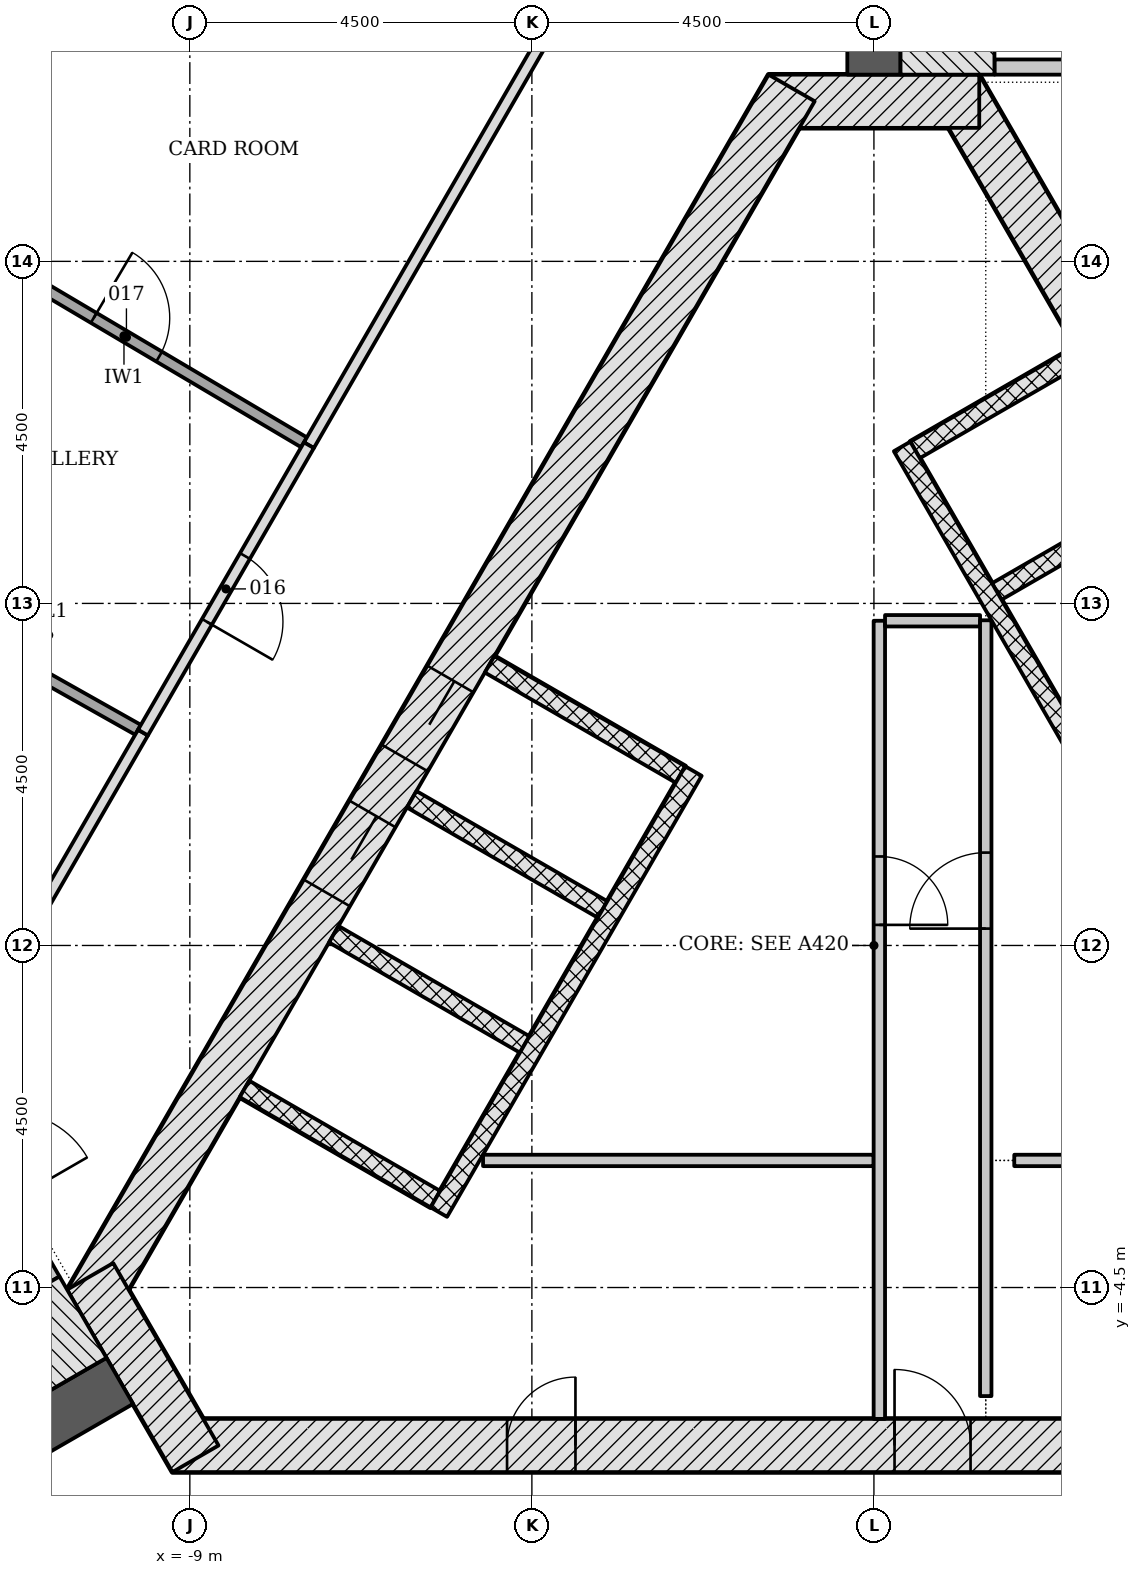
"""IFC4 building model, lengths in metres.
Left out: names, types, materials, properties, quantities, classifications, styles, units other than length and angle.
Written with IfcOpenShell. Run it as: python <this file> out.ifc"""

import sys

from ifc_helpers import new_model, si_unit, direction, frame, frame_2d, origin, place, context, subcontext, project, spatial, rectangle, extrude, element, fill, save


model = new_model("IFC4")
c1 = context("Model", 3, precision=1e-05, world=origin(), true_north=direction((0.0, 1.0)))
c2 = subcontext(c1, "Body", "Model", "MODEL_VIEW")
j1 = project(units=[si_unit("LENGTHUNIT", "METRE"), si_unit("PLANEANGLEUNIT", "RADIAN")], contexts=[c1])
p1 = place(None, origin())
s1 = spatial("IfcSite", under=j1, at=p1, CompositionType="ELEMENT")
p2 = place(p1, origin())
s2 = spatial("IfcBuilding", under=s1, at=p2, CompositionType="ELEMENT")
p3 = place(p2, frame((0.0, 0.0, 188.7)))
s3 = spatial("IfcBuildingStorey", under=s2, at=p3, CompositionType="ELEMENT", Elevation=188.7)
p4 = place(p3, frame((-9.229, -6.578, -0.2), z_axis=(0.0, 0.0, 1.0), x_axis=(1.0, 0.0, 0.0)))
e1 = element("IfcWall", 1, at=p4, inside=s3, PredefinedType="SHEAR", context=c2, shape_type="SweptSolid", body=[
    extrude(rectangle(XDim=18.458, YDim=0.7, at=frame_2d((9.229, 0.0))), origin(), (0.0, 0.0, 1.0), 3.6),
])
p5 = place(p4, frame((9.5, 0.0, 0.2)))
e2 = element("IfcOpeningElement", 2, at=p5, cuts=e1, PredefinedType="OPENING", context=c2, shape_type="SweptSolid", body=[
    extrude(rectangle(XDim=1.0, YDim=2.1, at=frame_2d((0.5, 1.05))), frame((0.0, 0.36, 0.0), z_axis=(0.0, -1.0, 0.0), x_axis=(1.0, 0.0, 0.0)), (0.0, 0.0, 1.0), 0.72),
])
p6 = place(p4, frame((4.402, 0.0, 0.2)))
e3 = element("IfcOpeningElement", 3, at=p6, cuts=e1, PredefinedType="OPENING", context=c2, shape_type="SweptSolid", body=[
    extrude(rectangle(XDim=0.9, YDim=2.1, at=frame_2d((0.45, 1.05))), frame((0.0, 0.36, 0.0), z_axis=(0.0, -1.0, 0.0), x_axis=(1.0, 0.0, 0.0)), (0.0, 0.0, 1.0), 0.72),
])
p7 = place(p4, frame((13.927, 0.0, 0.2)))
e4 = element("IfcOpeningElement", 4, at=p7, cuts=e1, PredefinedType="OPENING", context=c2, shape_type="SweptSolid", body=[
    extrude(rectangle(XDim=0.9, YDim=2.1, at=frame_2d((0.45, 1.05))), frame((0.0, 0.36, 0.0), z_axis=(0.0, -1.0, 0.0), x_axis=(1.0, 0.0, 0.0)), (0.0, 0.0, 1.0), 0.72),
])
p8 = place(p3, frame((10.311, -4.703, -0.2), z_axis=(0.0, 0.0, 1.0), x_axis=(-0.500001446645, 0.866024568562, 0.0)))
e5 = element("IfcWall", 5, at=p8, inside=s3, PredefinedType="SHEAR", context=c2, shape_type="SweptSolid", body=[
    extrude(rectangle(XDim=18.458, YDim=0.7, at=frame_2d((9.229, 0.0))), origin(), (0.0, 0.0, 1.0), 3.6),
])
p9 = place(p8, frame((4.379, 0.0, 0.2)))
e6 = element("IfcOpeningElement", 6, at=p9, cuts=e5, PredefinedType="OPENING", context=c2, shape_type="SweptSolid", body=[
    extrude(rectangle(XDim=1.1, YDim=2.1, at=frame_2d((0.55, 1.05))), frame((0.0, 0.36, 0.0), z_axis=(0.0, -1.0, 0.0), x_axis=(1.0, 0.0, 0.0)), (0.0, 0.0, 1.0), 0.72),
])
p10 = place(p8, frame((6.529, 0.0, 0.2)))
e7 = element("IfcOpeningElement", 7, at=p10, cuts=e5, PredefinedType="OPENING", context=c2, shape_type="SweptSolid", body=[
    extrude(rectangle(XDim=1.1, YDim=2.1, at=frame_2d((0.55, 1.05))), frame((0.0, 0.36, 0.0), z_axis=(0.0, -1.0, 0.0), x_axis=(1.0, 0.0, 0.0)), (0.0, 0.0, 1.0), 0.72),
])
p11 = place(p8, frame((8.679, 0.0, 0.2)))
e8 = element("IfcOpeningElement", 8, at=p11, cuts=e5, PredefinedType="OPENING", context=c2, shape_type="SweptSolid", body=[
    extrude(rectangle(XDim=1.1, YDim=2.1, at=frame_2d((0.55, 1.05))), frame((0.0, 0.36, 0.0), z_axis=(0.0, -1.0, 0.0), x_axis=(1.0, 0.0, 0.0)), (0.0, 0.0, 1.0), 0.72),
])
p12 = place(p8, frame((10.829, 0.0, 0.2)))
e9 = element("IfcOpeningElement", 9, at=p12, cuts=e5, PredefinedType="OPENING", context=c2, shape_type="SweptSolid", body=[
    extrude(rectangle(XDim=1.1, YDim=2.1, at=frame_2d((0.55, 1.05))), frame((0.0, 0.36, 0.0), z_axis=(0.0, -1.0, 0.0), x_axis=(1.0, 0.0, 0.0)), (0.0, 0.0, 1.0), 0.72),
])
p13 = place(p8, frame((12.979, 0.0, 0.2)))
e10 = element("IfcOpeningElement", 10, at=p13, cuts=e5, PredefinedType="OPENING", context=c2, shape_type="SweptSolid", body=[
    extrude(rectangle(XDim=1.1, YDim=2.1, at=frame_2d((0.55, 1.05))), frame((0.0, 0.36, 0.0), z_axis=(0.0, -1.0, 0.0), x_axis=(1.0, 0.0, 0.0)), (0.0, 0.0, 1.0), 0.72),
])
p14 = place(p3, frame((1.386, 11.106, -0.2), z_axis=(0.0, 0.0, 1.0), x_axis=(-1.0, 0.0, 0.0)))
e11 = element("IfcWall", 11, at=p14, inside=s3, PredefinedType="SHEAR", context=c2, shape_type="SweptSolid", body=[
    extrude(rectangle(XDim=2.771, YDim=0.7, at=frame_2d((1.386, 0.0))), origin(), (0.0, 0.0, 1.0), 3.6),
])
p15 = place(p3, frame((-1.083, 11.281, -0.2), z_axis=(0.0, 0.0, 1.0), x_axis=(-0.500001446645, -0.866024568562, 0.0)))
e12 = element("IfcWall", 12, at=p15, inside=s3, PredefinedType="SHEAR", context=c2, shape_type="SweptSolid", body=[
    extrude(rectangle(XDim=18.458, YDim=0.7, at=frame_2d((9.229, 0.0))), origin(), (0.0, 0.0, 1.0), 3.6),
])
p16 = place(p15, frame((8.979, 0.0, 0.2)))
e13 = element("IfcOpeningElement", 13, at=p16, cuts=e12, PredefinedType="OPENING", context=c2, shape_type="SweptSolid", body=[
    extrude(rectangle(XDim=1.2, YDim=2.1, at=frame_2d((0.6, 1.05))), frame((0.0, 0.36, 0.0), z_axis=(0.0, -1.0, 0.0), x_axis=(1.0, 0.0, 0.0)), (0.0, 0.0, 1.0), 0.72),
])
p17 = place(p15, frame((11.029, 0.0, 0.2)))
e14 = element("IfcOpeningElement", 14, at=p17, cuts=e12, PredefinedType="OPENING", context=c2, shape_type="SweptSolid", body=[
    extrude(rectangle(XDim=1.2, YDim=2.1, at=frame_2d((0.6, 1.05))), frame((0.0, 0.36, 0.0), z_axis=(0.0, -1.0, 0.0), x_axis=(1.0, 0.0, 0.0)), (0.0, 0.0, 1.0), 0.72),
])
p18 = place(p3, frame((-10.311, -4.353, -0.2), z_axis=(0.0, 0.0, 1.0), x_axis=(0.500042739161, -0.866000726912, 0.0)))
e15 = element("IfcWall", 15, at=p18, inside=s3, PredefinedType="SHEAR", context=c2, shape_type="SweptSolid", body=[
    extrude(rectangle(XDim=2.771, YDim=0.7, at=frame_2d((1.386, 0.0))), origin(), (0.0, 0.0, 1.0), 3.6),
])
p19 = place(p3, frame((0.0, 11.456, -0.2), z_axis=(0.0, 0.0, 1.0), x_axis=(0.0, 1.0, 0.0)))
e16 = element("IfcWall", 16, at=p19, inside=s3, PredefinedType="SHEAR", context=c2, shape_type="SweptSolid", body=[
    extrude(rectangle(XDim=9.522, YDim=0.7, at=frame_2d((4.761, 0.0))), origin(), (0.0, 0.0, 1.0), 3.6),
])
p20 = place(p3, frame((-9.922, -5.728, -0.2), z_axis=(0.0, 0.0, 1.0), x_axis=(-0.866025463095, -0.499999897272, 0.0)))
e17 = element("IfcWall", 17, at=p20, inside=s3, PredefinedType="SHEAR", context=c2, shape_type="SweptSolid", body=[
    extrude(rectangle(XDim=9.521, YDim=0.7, at=frame_2d((4.761, 0.0))), origin(), (0.0, 0.0, 1.0), 3.6),
])
for number, where, z_axis, x_axis in (
    (18, (3.781, 5.907, -0.2), (0.0, 0.0, 1.0), (-0.866, -0.5, 0.0)),
    (19, (2.706, 7.769, -0.2), (0.0, 0.0, 1.0), (-0.866, -0.5, 0.0)),
):
    element("IfcWall", number, at=place(p3, frame(where, z_axis=z_axis, x_axis=x_axis)), inside=s3, PredefinedType="PARTITIONING", context=c2, shape_type="SweptSolid", body=[
        extrude(rectangle(XDim=2.5, YDim=0.25, at=frame_2d((1.25, 0.0))), origin(), (0.0, 0.0, 1.0), 3.6),
    ])
p21 = place(p3, frame((5.87, -2.961, 0.0), z_axis=(0.0, 0.0, 1.0), x_axis=(-0.50000615651, 0.866021849293, 0.0)))
e20 = element("IfcWall", 20, at=p21, inside=s3, PredefinedType="PARTITIONING", context=c2, shape_type="SweptSolid", body=[
    extrude(rectangle(XDim=11.0, YDim=0.25, at=frame_2d((5.5, 0.0))), origin(), (0.0, 0.0, 1.0), 3.4),
])
for number, where, z_axis, x_axis in (
    (21, (-5.056, 3.699, -0.2), (0.0, 0.0, 1.0), (0.866, -0.5, 0.0)),
    (22, (-6.081, 1.923, -0.2), (0.0, 0.0, 1.0), (0.866, -0.5, 0.0)),
    (23, (-7.106, 0.148, -0.2), (0.0, 0.0, 1.0), (0.866, -0.5, 0.0)),
    (24, (-8.281, -1.887, -0.2), (0.0, 0.0, 1.0), (0.866, -0.5, 0.0)),
):
    element("IfcWall", number, at=place(p3, frame(where, z_axis=z_axis, x_axis=x_axis)), inside=s3, PredefinedType="PARTITIONING", context=c2, shape_type="SweptSolid", body=[
        extrude(rectangle(XDim=2.9, YDim=0.25, at=frame_2d((1.45, 0.0))), origin(), (0.0, 0.0, 1.0), 3.6),
    ])
p22 = place(p3, frame((-2.374, 2.294, 0.0), z_axis=(0.0, 0.0, 1.0), x_axis=(-0.500003174267, -0.866023571113, 0.0)))
e25 = element("IfcWall", 25, at=p22, inside=s3, PredefinedType="PARTITIONING", context=c2, shape_type="SweptSolid", body=[
    extrude(rectangle(XDim=6.7, YDim=0.25, at=frame_2d((3.35, 0.0))), origin(), (0.0, 0.0, 1.0), 3.4),
])
p23 = place(p3, frame((-5.142, -2.828, 0.0), z_axis=(0.0, 0.0, 1.0), x_axis=(1.0, 0.0, 0.0)))
e26 = element("IfcWall", 26, at=p23, inside=s3, PredefinedType="PARTITIONING", context=c2, shape_type="SweptSolid", body=[
    extrude(rectangle(XDim=5.139, YDim=0.15, at=frame_2d((2.569, 0.0))), origin(), (0.0, 0.0, 1.0), 3.4),
])
p24 = place(p3, frame((0.071, 4.272, 0.0), z_axis=(0.0, 0.0, 1.0), x_axis=(0.0, -1.0, 0.0)))
e27 = element("IfcWall", 27, at=p24, inside=s3, PredefinedType="PARTITIONING", context=c2, shape_type="SweptSolid", body=[
    extrude(rectangle(XDim=10.5, YDim=0.15, at=frame_2d((5.25, 0.0))), origin(), (0.0, 0.0, 1.0), 3.4),
])
p25 = place(p24, frame((3.101, 0.0, 0.0)))
e28 = element("IfcOpeningElement", 28, at=p25, cuts=e27, PredefinedType="OPENING", context=c2, shape_type="SweptSolid", body=[
    extrude(rectangle(XDim=0.9, YDim=2.1, at=frame_2d((0.45, 1.05))), frame((0.0, 0.085, 0.0), z_axis=(0.0, -1.0, 0.0), x_axis=(1.0, 0.0, 0.0)), (0.0, 0.0, 1.0), 0.17),
])
p26 = place(p3, frame((0.146, 4.272, 0.0), z_axis=(0.0, 0.0, 1.0), x_axis=(1.0, 0.0, 0.0)))
e29 = element("IfcWall", 29, at=p26, inside=s3, PredefinedType="PARTITIONING", context=c2, shape_type="SweptSolid", body=[
    extrude(rectangle(XDim=1.25, YDim=0.15, at=frame_2d((0.625, 0.0))), origin(), (0.0, 0.0, 1.0), 3.4),
])
p27 = place(p3, frame((1.471, -5.928, 0.0), z_axis=(0.0, 0.0, 1.0), x_axis=(0.0, 1.0, 0.0)))
e30 = element("IfcWall", 30, at=p27, inside=s3, PredefinedType="PARTITIONING", context=c2, shape_type="SweptSolid", body=[
    extrude(rectangle(XDim=10.206, YDim=0.15, at=frame_2d((5.103, 0.0))), origin(), (0.0, 0.0, 1.0), 3.4),
])
p28 = place(p27, frame((6.15, 0.0, 0.0)))
e31 = element("IfcOpeningElement", 31, at=p28, cuts=e30, PredefinedType="OPENING", context=c2, shape_type="SweptSolid", body=[
    extrude(rectangle(XDim=1.0, YDim=2.1, at=frame_2d((0.5, 1.05))), frame((0.0, 0.085, 0.0), z_axis=(0.0, -1.0, 0.0), x_axis=(1.0, 0.0, 0.0)), (0.0, 0.0, 1.0), 0.17),
])
p29 = place(p3, frame((1.846, -2.828, 0.0), z_axis=(0.0, 0.0, 1.0), x_axis=(1.0, 0.0, 0.0)))
e32 = element("IfcWall", 32, at=p29, inside=s3, PredefinedType="PARTITIONING", context=c2, shape_type="SweptSolid", body=[
    extrude(rectangle(XDim=3.758, YDim=0.15, at=frame_2d((1.879, 0.0))), origin(), (0.0, 0.0, 1.0), 3.4),
])
p30 = place(p3, frame((5.135, 11.556, -0.2), z_axis=(0.0, 0.0, 1.0), x_axis=(-1.0, 0.0, 0.0)))
e33 = element("IfcWall", 33, at=p30, inside=s3, PredefinedType="SHEAR", context=c2, shape_type="SweptSolid", body=[
    extrude(rectangle(XDim=3.55, YDim=0.2, at=frame_2d((1.775, 0.0))), origin(), (0.0, 0.0, 1.0), 3.6),
])
p31 = place(p30, frame((1.175, 0.0, 0.2)))
e34 = element("IfcOpeningElement", 34, at=p31, cuts=e33, PredefinedType="OPENING", context=c2, shape_type="SweptSolid", body=[
    extrude(rectangle(XDim=1.2, YDim=2.1, at=frame_2d((0.6, 1.05))), frame((0.0, 0.11, 0.0), z_axis=(0.0, -1.0, 0.0), x_axis=(1.0, 0.0, 0.0)), (0.0, 0.0, 1.0), 0.22),
])
p32 = place(p3, frame((0.968, 11.456, -0.2), z_axis=(0.0, 0.0, 1.0), x_axis=(0.0, 1.0, 0.0)))
e35 = element("IfcWall", 35, at=p32, inside=s3, PredefinedType="SHEAR", context=c2, shape_type="SweptSolid", body=[
    extrude(rectangle(XDim=7.2, YDim=1.236, at=frame_2d((3.6, 0.0))), origin(), (0.0, 0.0, 1.0), 3.6),
])
p33 = place(p3, frame((-12.576, -1.331, -0.2), z_axis=(0.0, 0.0, 1.0), x_axis=(0.499970499736, -0.8660424351, 0.0)))
e36 = element("IfcWall", 36, at=p33, inside=s3, PredefinedType="SHEAR", context=c2, shape_type="SweptSolid", body=[
    extrude(rectangle(XDim=3.55, YDim=0.2, at=frame_2d((1.775, 0.0))), origin(), (0.0, 0.0, 1.0), 3.6),
])
p34 = place(p33, frame((1.175, 0.0, 0.2)))
e37 = element("IfcOpeningElement", 37, at=p34, cuts=e36, PredefinedType="OPENING", context=c2, shape_type="SweptSolid", body=[
    extrude(rectangle(XDim=1.2, YDim=2.1, at=frame_2d((0.6, 1.05))), frame((0.0, 0.11, 0.0), z_axis=(0.0, -1.0, 0.0), x_axis=(1.0, 0.0, 0.0)), (0.0, 0.0, 1.0), 0.22),
])
p35 = place(p3, frame((-10.406, -4.89, -0.2), z_axis=(0.0, 0.0, 1.0), x_axis=(-0.866018442252, -0.500012057535, 0.0)))
e38 = element("IfcWall", 38, at=p35, inside=s3, PredefinedType="SHEAR", context=c2, shape_type="SweptSolid", body=[
    extrude(rectangle(XDim=7.2, YDim=1.236, at=frame_2d((3.6, 0.0))), origin(), (0.0, 0.0, 1.0), 3.6),
])
p36 = place(p3, frame((-0.35, 18.85, 0.0), z_axis=(0.0, 0.0, 1.0), x_axis=(-0.500005388685, -0.866022292603, 0.0)))
e39 = element("IfcWall", 39, at=p36, inside=s3, PredefinedType="PARTITIONING", context=c2, shape_type="SweptSolid", body=[
    extrude(rectangle(XDim=14.167, YDim=0.15, at=frame_2d((7.083, 0.0))), origin(), (0.0, 0.0, 1.0), 2.852),
])
p37 = place(p3, frame((-9.616, 2.801, 0.0), z_axis=(0.0, 0.0, 1.0), x_axis=(-0.499995206172, -0.866028171485, 0.0)))
e40 = element("IfcWall", 40, at=p37, inside=s3, PredefinedType="PARTITIONING", context=c2, shape_type="SweptSolid", body=[
    extrude(rectangle(XDim=5.114, YDim=0.15, at=frame_2d((2.557, 0.0))), origin(), (0.0, 0.0, 1.0), 2.852),
])
p38 = place(p3, frame((-12.235, 9.422, 0.0), z_axis=(0.0, 0.0, 1.0), x_axis=(0.860631434237, -0.509228371562, 0.0)))
e41 = element("IfcWall", 41, at=p38, inside=s3, PredefinedType="PARTITIONING", context=c2, shape_type="SweptSolid", body=[
    extrude(rectangle(XDim=5.504, YDim=0.15, at=frame_2d((2.752, 0.0))), origin(), (0.0, 0.0, 1.0), 2.461),
])
p39 = place(p38, frame((2.29, 0.0, 0.0)))
e42 = element("IfcOpeningElement", 42, at=p39, cuts=e41, PredefinedType="OPENING", context=c2, shape_type="SweptSolid", body=[
    extrude(rectangle(XDim=1.0, YDim=2.1, at=frame_2d((0.5, 1.05))), frame((0.0, 0.085, 0.0), z_axis=(0.0, -1.0, 0.0), x_axis=(1.0, 0.0, 0.0)), (0.0, 0.0, 1.0), 0.17),
])
p40 = place(p3, frame((-14.474, 5.536, 0.0), z_axis=(0.0, 0.0, 1.0), x_axis=(0.871324088074, -0.490707992132, 0.0)))
e43 = element("IfcWall", 43, at=p40, inside=s3, PredefinedType="PARTITIONING", context=c2, shape_type="SweptSolid", body=[
    extrude(rectangle(XDim=5.5, YDim=0.15, at=frame_2d((2.75, 0.0))), origin(), (0.0, 0.0, 1.0), 2.461),
])
p41 = place(p40, frame((2.287, 0.0, 0.0)))
e44 = element("IfcOpeningElement", 44, at=p41, cuts=e43, PredefinedType="OPENING", context=c2, shape_type="SweptSolid", body=[
    extrude(rectangle(XDim=1.0, YDim=2.1, at=frame_2d((0.5, 1.05))), frame((0.0, 0.085, 0.0), z_axis=(0.0, -1.0, 0.0), x_axis=(1.0, 0.0, 0.0)), (0.0, 0.0, 1.0), 0.17),
])
p42 = place(p3, frame((-7.434, 6.581, 0.0), z_axis=(0.0, 0.0, 1.0), x_axis=(-0.499964504253, -0.866045896294, 0.0)))
e45 = element("IfcWall", 45, at=p42, inside=s3, PredefinedType="PARTITIONING", context=c2, shape_type="SweptSolid", body=[
    extrude(rectangle(XDim=4.365, YDim=0.15, at=frame_2d((2.183, 0.0))), origin(), (0.0, 0.0, 1.0), 2.852),
])
p43 = place(p42, frame((1.683, 0.0, 0.0)))
e46 = element("IfcOpeningElement", 46, at=p43, cuts=e45, PredefinedType="OPENING", context=c2, shape_type="SweptSolid", body=[
    extrude(rectangle(XDim=1.0, YDim=2.1, at=frame_2d((0.5, 1.05))), frame((0.0, 0.085, 0.0), z_axis=(0.0, -1.0, 0.0), x_axis=(1.0, 0.0, 0.0)), (0.0, 0.0, 1.0), 0.17),
])
p44 = place(p16, origin())
e47 = element("IfcDoor", 47, at=p44, inside=s3, OperationType="DOUBLE_DOOR_SLIDING", PredefinedType="DOOR", context=c2, shape_type="SweptSolid", body=[
    extrude(rectangle(XDim=1.2, YDim=2.1, at=frame_2d((0.6, 1.05))), frame((0.0, 0.025, 0.0), z_axis=(0.0, -1.0, 0.0), x_axis=(1.0, 0.0, 0.0)), (0.0, 0.0, 1.0), 0.05),
])
fill(e13, e47)
p45 = place(p17, origin())
e48 = element("IfcDoor", 48, at=p45, inside=s3, OperationType="DOUBLE_DOOR_SLIDING", PredefinedType="DOOR", context=c2, shape_type="SweptSolid", body=[
    extrude(rectangle(XDim=1.2, YDim=2.1, at=frame_2d((0.6, 1.05))), frame((0.0, 0.025, 0.0), z_axis=(0.0, -1.0, 0.0), x_axis=(1.0, 0.0, 0.0)), (0.0, 0.0, 1.0), 0.05),
])
fill(e14, e48)
p46 = place(p5, origin())
e49 = element("IfcDoor", 49, at=p46, inside=s3, OperationType="SINGLE_SWING_LEFT", PredefinedType="DOOR", context=c2, shape_type="SweptSolid", body=[
    extrude(rectangle(XDim=1.0, YDim=2.1, at=frame_2d((0.5, 1.05))), frame((0.0, 0.075, 0.0), z_axis=(0.0, -1.0, 0.0), x_axis=(1.0, 0.0, 0.0)), (0.0, 0.0, 1.0), 0.15),
])
fill(e2, e49)
p47 = place(p6, origin())
e50 = element("IfcDoor", 50, at=p47, inside=s3, OperationType="SINGLE_SWING_RIGHT", PredefinedType="DOOR", context=c2, shape_type="SweptSolid", body=[
    extrude(rectangle(XDim=0.9, YDim=2.1, at=frame_2d((0.45, 1.05))), frame((0.0, 0.075, 0.0), z_axis=(0.0, -1.0, 0.0), x_axis=(1.0, 0.0, 0.0)), (0.0, 0.0, 1.0), 0.15),
])
fill(e3, e50)
p48 = place(p25, origin())
e51 = element("IfcDoor", 51, at=p48, inside=s3, OperationType="SINGLE_SWING_RIGHT", PredefinedType="DOOR", context=c2, shape_type="SweptSolid", body=[
    extrude(rectangle(XDim=0.9, YDim=2.1, at=frame_2d((0.45, 1.05))), frame((0.0, 0.025, 0.0), z_axis=(0.0, -1.0, 0.0), x_axis=(1.0, 0.0, 0.0)), (0.0, 0.0, 1.0), 0.05),
])
fill(e28, e51)
p49 = place(p28, origin())
e52 = element("IfcDoor", 52, at=p49, inside=s3, OperationType="SINGLE_SWING_LEFT", PredefinedType="DOOR", context=c2, shape_type="SweptSolid", body=[
    extrude(rectangle(XDim=1.0, YDim=2.1, at=frame_2d((0.5, 1.05))), frame((0.0, 0.025, 0.0), z_axis=(0.0, -1.0, 0.0), x_axis=(1.0, 0.0, 0.0)), (0.0, 0.0, 1.0), 0.05),
])
fill(e31, e52)
p50 = place(p43, origin())
e53 = element("IfcDoor", 53, at=p50, inside=s3, OperationType="SINGLE_SWING_RIGHT", PredefinedType="DOOR", context=c2, shape_type="SweptSolid", body=[
    extrude(rectangle(XDim=1.0, YDim=2.1, at=frame_2d((0.5, 1.05))), frame((0.0, 0.025, 0.0), z_axis=(0.0, -1.0, 0.0), x_axis=(1.0, 0.0, 0.0)), (0.0, 0.0, 1.0), 0.05),
])
fill(e46, e53)
p51 = place(p39, origin())
e54 = element("IfcDoor", 54, at=p51, inside=s3, OperationType="SINGLE_SWING_LEFT", PredefinedType="DOOR", context=c2, shape_type="SweptSolid", body=[
    extrude(rectangle(XDim=1.0, YDim=2.1, at=frame_2d((0.5, 1.05))), frame((0.0, 0.025, 0.0), z_axis=(0.0, -1.0, 0.0), x_axis=(1.0, 0.0, 0.0)), (0.0, 0.0, 1.0), 0.05),
])
fill(e42, e54)
save(model, sys.argv[1])
